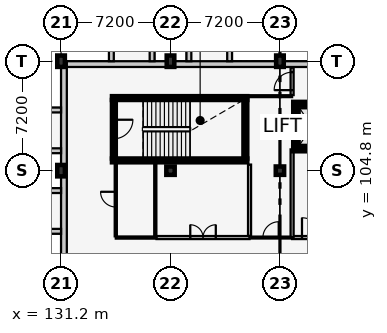
"""IFC4 building model, lengths in metres.
Left out: names, types, materials, properties, quantities, classifications, styles, units other than length and angle.
Written with IfcOpenShell. Run it as: python <this file> out.ifc"""

import sys

from ifc_helpers import new_model, si_unit, direction, frame, frame_2d, origin, origin_2d, place, context, subcontext, project, spatial, rectangle, extrude, element, fill, save


model = new_model("IFC4")
c1 = context("Model", 3, precision=1e-05, world=origin(), true_north=direction((0.0, 1.0)))
c2 = subcontext(c1, "Body", "Model", "MODEL_VIEW")
j1 = project(units=[si_unit("LENGTHUNIT", "METRE"), si_unit("PLANEANGLEUNIT", "RADIAN")], contexts=[c1])
p1 = place(None, origin())
s1 = spatial("IfcSite", under=j1, at=p1, CompositionType="ELEMENT")
p2 = place(p1, origin())
s2 = spatial("IfcBuilding", under=s1, at=p2, CompositionType="ELEMENT")
p3 = place(p2, frame((0.0, 0.0, 25.8)))
s3 = spatial("IfcBuildingStorey", under=s2, at=p3, CompositionType="ELEMENT", Elevation=25.8)
for number, where, z_axis, x_axis in (
    (1, (131.2, 104.8, 0.0), (0.0, 0.0, 1.0), (1.0, 0.0, 0.0)),
    (2, (131.2, 112.0, 0.0), (0.0, 0.0, 1.0), (1.0, 0.0, 0.0)),
):
    element("IfcColumn", number, at=place(p3, frame(where, z_axis=z_axis, x_axis=x_axis)), inside=s3, PredefinedType="COLUMN", context=c2, shape_type="SweptSolid", body=[
        extrude(rectangle(XDim=0.5, YDim=0.75, at=origin_2d()), origin(), (0.0, 0.0, 1.0), 3.9),
    ])
p4 = place(p3, frame((138.4, 104.8, 0.0), z_axis=(0.0, 0.0, 1.0), x_axis=(1.0, 0.0, 0.0)))
e3 = element("IfcColumn", 3, at=p4, inside=s3, PredefinedType="COLUMN", context=c2, shape_type="SweptSolid", body=[
    extrude(rectangle(XDim=0.55, YDim=0.55, at=origin_2d()), origin(), (0.0, 0.0, 1.0), 3.9),
])
p5 = place(p3, frame((138.4, 112.0, 0.0), z_axis=(0.0, 0.0, 1.0), x_axis=(1.0, 0.0, 0.0)))
e4 = element("IfcColumn", 4, at=p5, inside=s3, PredefinedType="COLUMN", context=c2, shape_type="SweptSolid", body=[
    extrude(rectangle(XDim=0.5, YDim=0.75, at=origin_2d()), origin(), (0.0, 0.0, 1.0), 3.9),
])
p6 = place(p3, frame((145.6, 104.8, 0.0), z_axis=(0.0, 0.0, 1.0), x_axis=(1.0, 0.0, 0.0)))
e5 = element("IfcColumn", 5, at=p6, inside=s3, PredefinedType="COLUMN", context=c2, shape_type="SweptSolid", body=[
    extrude(rectangle(XDim=0.55, YDim=0.55, at=origin_2d()), origin(), (0.0, 0.0, 1.0), 3.9),
])
p7 = place(p3, frame((145.6, 112.0, 0.0), z_axis=(0.0, 0.0, 1.0), x_axis=(1.0, 0.0, 0.0)))
e6 = element("IfcColumn", 6, at=p7, inside=s3, PredefinedType="COLUMN", context=c2, shape_type="SweptSolid", body=[
    extrude(rectangle(XDim=0.5, YDim=0.75, at=origin_2d()), origin(), (0.0, 0.0, 1.0), 3.9),
])
p8 = place(p3, frame((131.2, 111.81, 0.0), z_axis=(0.0, 0.0, 1.0), x_axis=(1.0, 0.0, 0.0)))
e7 = element("IfcWall", 7, at=p8, inside=s3, PredefinedType="SOLIDWALL", context=c2, shape_type="SweptSolid", body=[
    extrude(rectangle(XDim=28.8, YDim=0.38, at=frame_2d((14.4, 0.0))), origin(), (0.0, 0.0, 1.0), 2.945),
])
p9 = place(p3, frame((134.51, 112.0, 0.0), z_axis=(0.0, 0.0, 1.0), x_axis=(0.0, 1.0, 0.0)))
e8 = element("IfcWall", 8, at=p9, inside=s3, PredefinedType="SOLIDWALL", context=c2, shape_type="SweptSolid", body=[
    extrude(rectangle(XDim=1.35, YDim=0.32, at=frame_2d((0.675, 0.0))), origin(), (0.0, 0.0, 1.0), 3.63),
])
for number, where, z_axis, x_axis in (
    (9, (137.19, 112.0, 0.0), (0.0, 0.0, 1.0), (0.0, 1.0, 0.0)),
    (10, (139.61, 112.0, 0.0), (0.0, 0.0, 1.0), (0.0, 1.0, 0.0)),
):
    element("IfcWall", number, at=place(p3, frame(where, z_axis=z_axis, x_axis=x_axis)), inside=s3, PredefinedType="SOLIDWALL", context=c2, shape_type="SweptSolid", body=[
        extrude(rectangle(XDim=1.793, YDim=0.32, at=frame_2d((0.896, 0.0))), origin(), (0.0, 0.0, 1.0), 3.63),
    ])
p10 = place(p3, frame((142.29, 112.0, 0.0), z_axis=(0.0, 0.0, 1.0), x_axis=(0.0, 1.0, 0.0)))
e11 = element("IfcWall", 11, at=p10, inside=s3, PredefinedType="SOLIDWALL", context=c2, shape_type="SweptSolid", body=[
    extrude(rectangle(XDim=1.35, YDim=0.32, at=frame_2d((0.675, 0.0))), origin(), (0.0, 0.0, 1.0), 3.63),
])
p11 = place(p3, frame((131.39, 83.2, 0.0), z_axis=(0.0, 0.0, 1.0), x_axis=(0.0, 1.0, 0.0)))
e12 = element("IfcWall", 12, at=p11, inside=s3, PredefinedType="SOLIDWALL", context=c2, shape_type="SweptSolid", body=[
    extrude(rectangle(XDim=28.8, YDim=0.38, at=frame_2d((14.4, 0.0))), origin(), (0.0, 0.0, 1.0), 3.045),
])
p12 = place(p11, frame((10.1, 0.0, 0.0)))
e13 = element("IfcOpeningElement", 13, at=p12, cuts=e12, PredefinedType="OPENING", context=c2, shape_type="SweptSolid", body=[
    extrude(rectangle(XDim=1.4, YDim=2.2, at=frame_2d((0.7, 1.1))), frame((0.0, 0.202, 0.0), z_axis=(0.0, -1.0, 0.0), x_axis=(1.0, 0.0, 0.0)), (0.0, 0.0, 1.0), 0.404),
])
p13 = place(p3, frame((131.2, 100.81, 0.0), z_axis=(0.0, 0.0, 1.0), x_axis=(-1.0, 0.0, 0.0)))
e14 = element("IfcWall", 14, at=p13, inside=s3, PredefinedType="SOLIDWALL", context=c2, shape_type="SweptSolid", body=[
    extrude(rectangle(XDim=1.35, YDim=0.32, at=frame_2d((0.675, 0.0))), origin(), (0.0, 0.0, 1.0), 3.63),
])
for number, where, z_axis, x_axis in (
    (15, (131.2, 103.49, 0.0), (0.0, 0.0, 1.0), (-1.0, 0.0, 0.0)),
    (16, (131.2, 106.11, 0.0), (0.0, 0.0, 1.0), (-1.0, 0.0, 0.0)),
):
    element("IfcWall", number, at=place(p3, frame(where, z_axis=z_axis, x_axis=x_axis)), inside=s3, PredefinedType="SOLIDWALL", context=c2, shape_type="SweptSolid", body=[
        extrude(rectangle(XDim=1.793, YDim=0.32, at=frame_2d((0.896, 0.0))), origin(), (0.0, 0.0, 1.0), 3.63),
    ])
p14 = place(p3, frame((131.2, 108.79, 0.0), z_axis=(0.0, 0.0, 1.0), x_axis=(-1.0, 0.0, 0.0)))
e17 = element("IfcWall", 17, at=p14, inside=s3, PredefinedType="SOLIDWALL", context=c2, shape_type="SweptSolid", body=[
    extrude(rectangle(XDim=1.35, YDim=0.32, at=frame_2d((0.675, 0.0))), origin(), (0.0, 0.0, 1.0), 3.63),
])
for number, where, z_axis, x_axis in (
    (18, (134.55, 105.475, 0.0), (0.0, 0.0, 1.0), (1.0, 0.0, 0.0)),
    (19, (143.45, 109.575, 0.0), (0.0, 0.0, 1.0), (-1.0, 0.0, 0.0)),
):
    element("IfcWall", number, at=place(p3, frame(where, z_axis=z_axis, x_axis=x_axis)), inside=s3, PredefinedType="SHEAR", context=c2, shape_type="SweptSolid", body=[
        extrude(rectangle(XDim=8.9, YDim=0.25, at=frame_2d((4.45, 0.0))), origin(), (0.0, 0.0, 1.0), 3.65),
    ])
p15 = place(p3, frame((134.675, 109.45, 0.0), z_axis=(0.0, 0.0, 1.0), x_axis=(0.0, -1.0, 0.0)))
e20 = element("IfcWall", 20, at=p15, inside=s3, PredefinedType="SHEAR", context=c2, shape_type="SweptSolid", body=[
    extrude(rectangle(XDim=3.85, YDim=0.25, at=frame_2d((1.925, 0.0))), origin(), (0.0, 0.0, 1.0), 3.65),
])
p16 = place(p15, frame((1.3, 0.0, 0.0)))
e21 = element("IfcOpeningElement", 21, at=p16, cuts=e20, PredefinedType="OPENING", context=c2, shape_type="SweptSolid", body=[
    extrude(rectangle(XDim=1.25, YDim=2.15, at=frame_2d((0.625, 1.075))), frame((0.0, 0.137, 0.0), z_axis=(0.0, -1.0, 0.0), x_axis=(1.0, 0.0, 0.0)), (0.0, 0.0, 1.0), 0.274),
])
p17 = place(p3, frame((143.325, 105.6, 0.0), z_axis=(0.0, 0.0, 1.0), x_axis=(0.0, 1.0, 0.0)))
e22 = element("IfcWall", 22, at=p17, inside=s3, PredefinedType="SHEAR", context=c2, shape_type="SweptSolid", body=[
    extrude(rectangle(XDim=3.85, YDim=0.25, at=frame_2d((1.925, 0.0))), origin(), (0.0, 0.0, 1.0), 3.65),
])
p18 = place(p3, frame((146.475, 106.2, 0.0), z_axis=(0.0, 0.0, 1.0), x_axis=(1.0, 0.0, 0.0)))
e23 = element("IfcWall", 23, at=p18, inside=s3, PredefinedType="SHEAR", context=c2, shape_type="SweptSolid", body=[
    extrude(rectangle(XDim=2.45, YDim=0.25, at=frame_2d((1.225, 0.0))), origin(), (0.0, 0.0, 1.0), 3.65),
])
p19 = place(p18, frame((0.675, 0.0, 0.0)))
e24 = element("IfcOpeningElement", 24, at=p19, cuts=e23, PredefinedType="OPENING", context=c2, shape_type="SweptSolid", body=[
    extrude(rectangle(XDim=1.1, YDim=2.15, at=frame_2d((0.55, 1.075))), frame((0.0, 0.137, 0.0), z_axis=(0.0, -1.0, 0.0), x_axis=(1.0, 0.0, 0.0)), (0.0, 0.0, 1.0), 0.274),
])
p20 = place(p3, frame((148.925, 109.2, 0.0), z_axis=(0.0, 0.0, 1.0), x_axis=(-1.0, 0.0, 0.0)))
e25 = element("IfcWall", 25, at=p20, inside=s3, PredefinedType="SHEAR", context=c2, shape_type="SweptSolid", body=[
    extrude(rectangle(XDim=2.45, YDim=0.25, at=frame_2d((1.225, 0.0))), origin(), (0.0, 0.0, 1.0), 3.65),
])
p21 = place(p3, frame((146.6, 109.2, 0.0), z_axis=(0.0, 0.0, 1.0), x_axis=(0.0, -1.0, 0.0)))
e26 = element("IfcWall", 26, at=p21, inside=s3, PredefinedType="SHEAR", context=c2, shape_type="SweptSolid", body=[
    extrude(rectangle(XDim=3.0, YDim=0.25, at=frame_2d((1.5, 0.0))), origin(), (0.0, 0.0, 1.0), 3.65),
])
p22 = place(p3, frame((146.4, 100.4, 0.0), z_axis=(0.0, 0.0, 1.0), x_axis=(1.0, 0.0, 0.0)))
e27 = element("IfcWall", 27, at=p22, inside=s3, PredefinedType="PARTITIONING", context=c2, shape_type="SweptSolid", body=[
    extrude(rectangle(XDim=2.6, YDim=0.2, at=frame_2d((1.3, 0.0))), origin(), (0.0, 0.0, 1.0), 3.65),
])
p23 = place(p22, frame((0.65, 0.0, 0.0)))
e28 = element("IfcOpeningElement", 28, at=p23, cuts=e27, PredefinedType="OPENING", context=c2, shape_type="SweptSolid", body=[
    extrude(rectangle(XDim=1.3, YDim=2.2, at=frame_2d((0.65, 1.1))), frame((0.0, 0.112, 0.0), z_axis=(0.0, -1.0, 0.0), x_axis=(1.0, 0.0, 0.0)), (0.0, 0.0, 1.0), 0.224),
])
p24 = place(p3, frame((146.4, 106.2, 0.0), z_axis=(0.0, 0.0, 1.0), x_axis=(0.0, -1.0, 0.0)))
e29 = element("IfcWall", 29, at=p24, inside=s3, PredefinedType="PARTITIONING", context=c2, shape_type="SweptSolid", body=[
    extrude(rectangle(XDim=5.8, YDim=0.2, at=frame_2d((2.9, 0.0))), origin(), (0.0, 0.0, 1.0), 3.65),
])
p25 = place(p3, frame((134.8, 100.4, 0.0), z_axis=(0.0, 0.0, 1.0), x_axis=(1.0, 0.0, 0.0)))
e30 = element("IfcWall", 30, at=p25, inside=s3, PredefinedType="PARTITIONING", context=c2, shape_type="SweptSolid", body=[
    extrude(rectangle(XDim=2.6, YDim=0.14, at=frame_2d((1.3, 0.0))), origin(), (0.0, 0.0, 1.0), 3.65),
])
p26 = place(p3, frame((134.8, 100.48, 0.0), z_axis=(0.0, 0.0, 1.0), x_axis=(0.0, 1.0, 0.0)))
e31 = element("IfcWall", 31, at=p26, inside=s3, PredefinedType="PARTITIONING", context=c2, shape_type="SweptSolid", body=[
    extrude(rectangle(XDim=4.86, YDim=0.14, at=frame_2d((2.43, 0.0))), origin(), (0.0, 0.0, 1.0), 3.075),
])
p27 = place(p26, frame((1.93, 0.0, 0.0)))
e32 = element("IfcOpeningElement", 32, at=p27, cuts=e31, PredefinedType="OPENING", context=c2, shape_type="SweptSolid", body=[
    extrude(rectangle(XDim=1.0, YDim=2.1, at=frame_2d((0.5, 1.05))), frame((0.0, 0.082, 0.0), z_axis=(0.0, -1.0, 0.0), x_axis=(1.0, 0.0, 0.0)), (0.0, 0.0, 1.0), 0.164),
])
p28 = place(p3, frame((137.4, 100.48, 0.0), z_axis=(0.0, 0.0, 1.0), x_axis=(0.0, 1.0, 0.0)))
e33 = element("IfcWall", 33, at=p28, inside=s3, PredefinedType="PARTITIONING", context=c2, shape_type="SweptSolid", body=[
    extrude(rectangle(XDim=4.86, YDim=0.14, at=frame_2d((2.43, 0.0))), origin(), (0.0, 0.0, 1.0), 3.65),
])
p29 = place(p3, frame((137.48, 100.4, 0.0), z_axis=(0.0, 0.0, 1.0), x_axis=(1.0, 0.0, 0.0)))
e34 = element("IfcWall", 34, at=p29, inside=s3, PredefinedType="PARTITIONING", context=c2, shape_type="SweptSolid", body=[
    extrude(rectangle(XDim=6.12, YDim=0.2, at=frame_2d((3.06, 0.0))), origin(), (0.0, 0.0, 1.0), 3.65),
])
p30 = place(p29, frame((2.22, 0.0, 0.0)))
e35 = element("IfcOpeningElement", 35, at=p30, cuts=e34, PredefinedType="OPENING", context=c2, shape_type="SweptSolid", body=[
    extrude(rectangle(XDim=1.68, YDim=2.3, at=frame_2d((0.84, 1.15))), frame((0.0, 0.112, 0.0), z_axis=(0.0, -1.0, 0.0), x_axis=(1.0, 0.0, 0.0)), (0.0, 0.0, 1.0), 0.224),
])
p31 = place(p3, frame((143.6, 100.51, 0.0), z_axis=(0.0, 0.0, 1.0), x_axis=(0.0, 1.0, 0.0)))
e36 = element("IfcWall", 36, at=p31, inside=s3, PredefinedType="PARTITIONING", context=c2, shape_type="SweptSolid", body=[
    extrude(rectangle(XDim=4.69, YDim=0.2, at=frame_2d((2.345, 0.0))), origin(), (0.0, 0.0, 1.0), 3.65),
])
p32 = place(p3, frame((143.71, 100.4, 0.0), z_axis=(0.0, 0.0, 1.0), x_axis=(1.0, 0.0, 0.0)))
e37 = element("IfcWall", 37, at=p32, inside=s3, PredefinedType="PARTITIONING", context=c2, shape_type="SweptSolid", body=[
    extrude(rectangle(XDim=2.58, YDim=0.125, at=frame_2d((1.29, 0.0))), origin(), (0.0, 0.0, 1.0), 3.65),
])
p33 = place(p32, frame((0.77, 0.0, 0.0)))
e38 = element("IfcOpeningElement", 38, at=p33, cuts=e37, PredefinedType="OPENING", context=c2, shape_type="SweptSolid", body=[
    extrude(rectangle(XDim=1.04, YDim=2.15, at=frame_2d((0.52, 1.075))), frame((0.0, 0.074, 0.0), z_axis=(0.0, -1.0, 0.0), x_axis=(1.0, 0.0, 0.0)), (0.0, 0.0, 1.0), 0.149),
])
p34 = place(p3, frame((143.6, 109.7, 0.0), z_axis=(0.0, 0.0, 1.0), x_axis=(1.0, 0.0, 0.0)))
e39 = element("IfcWall", 39, at=p34, inside=s3, PredefinedType="PARTITIONING", context=c2, shape_type="SweptSolid", body=[
    extrude(rectangle(XDim=2.8, YDim=0.125, at=frame_2d((1.4, 0.0))), origin(), (0.0, 0.0, 1.0), 3.65),
])
p35 = place(p3, frame((146.4, 109.772, 0.0), z_axis=(0.0, 0.0, 1.0), x_axis=(0.0, 1.0, 0.0)))
e40 = element("IfcWall", 40, at=p35, inside=s3, PredefinedType="PARTITIONING", context=c2, shape_type="SweptSolid", body=[
    extrude(rectangle(XDim=1.828, YDim=0.2, at=frame_2d((0.914, 0.0))), origin(), (0.0, 0.0, 1.0), 3.65),
])
p36 = place(p35, frame((0.324, 0.0, 0.0)))
e41 = element("IfcOpeningElement", 41, at=p36, cuts=e40, PredefinedType="OPENING", context=c2, shape_type="SweptSolid", body=[
    extrude(rectangle(XDim=1.18, YDim=2.2, at=frame_2d((0.59, 1.1))), frame((0.0, 0.112, 0.0), z_axis=(0.0, -1.0, 0.0), x_axis=(1.0, 0.0, 0.0)), (0.0, 0.0, 1.0), 0.224),
])
p37 = place(p16, origin())
e42 = element("IfcDoor", 42, at=p37, inside=s3, OperationType="SINGLE_SWING_LEFT", PredefinedType="DOOR", context=c2, shape_type="SweptSolid", body=[
    extrude(rectangle(XDim=1.25, YDim=2.15, at=frame_2d((0.625, 1.075))), frame((0.0, 0.025, 0.0), z_axis=(0.0, -1.0, 0.0), x_axis=(1.0, 0.0, 0.0)), (0.0, 0.0, 1.0), 0.05),
])
fill(e21, e42)
p38 = place(p19, origin())
e43 = element("IfcDoor", 43, at=p38, inside=s3, OperationType="SLIDING_TO_LEFT", PredefinedType="DOOR", context=c2, shape_type="SweptSolid", body=[
    extrude(rectangle(XDim=1.1, YDim=2.15, at=frame_2d((0.55, 1.075))), frame((0.0, 0.025, 0.0), z_axis=(0.0, -1.0, 0.0), x_axis=(1.0, 0.0, 0.0)), (0.0, 0.0, 1.0), 0.05),
])
fill(e24, e43)
p39 = place(p23, origin())
e44 = element("IfcDoor", 44, at=p39, inside=s3, OperationType="SINGLE_SWING_LEFT", PredefinedType="DOOR", context=c2, shape_type="SweptSolid", body=[
    extrude(rectangle(XDim=1.3, YDim=2.2, at=frame_2d((0.65, 1.1))), frame((0.0, 0.025, 0.0), z_axis=(0.0, -1.0, 0.0), x_axis=(1.0, 0.0, 0.0)), (0.0, 0.0, 1.0), 0.05),
])
fill(e28, e44)
p40 = place(p27, origin())
e45 = element("IfcDoor", 45, at=p40, inside=s3, OperationType="SINGLE_SWING_RIGHT", PredefinedType="DOOR", context=c2, shape_type="SweptSolid", body=[
    extrude(rectangle(XDim=1.0, YDim=2.1, at=frame_2d((0.5, 1.05))), frame((0.0, 0.025, 0.0), z_axis=(0.0, -1.0, 0.0), x_axis=(1.0, 0.0, 0.0)), (0.0, 0.0, 1.0), 0.05),
])
fill(e32, e45)
p41 = place(p30, origin())
e46 = element("IfcDoor", 46, at=p41, inside=s3, OperationType="DOUBLE_DOOR_SINGLE_SWING", PredefinedType="DOOR", context=c2, shape_type="SweptSolid", body=[
    extrude(rectangle(XDim=1.68, YDim=2.3, at=frame_2d((0.84, 1.15))), frame((0.0, 0.025, 0.0), z_axis=(0.0, -1.0, 0.0), x_axis=(1.0, 0.0, 0.0)), (0.0, 0.0, 1.0), 0.05),
])
fill(e35, e46)
p42 = place(p33, origin())
e47 = element("IfcDoor", 47, at=p42, inside=s3, OperationType="SINGLE_SWING_RIGHT", PredefinedType="DOOR", context=c2, shape_type="SweptSolid", body=[
    extrude(rectangle(XDim=1.04, YDim=2.15, at=frame_2d((0.52, 1.075))), frame((0.0, 0.025, 0.0), z_axis=(0.0, -1.0, 0.0), x_axis=(1.0, 0.0, 0.0)), (0.0, 0.0, 1.0), 0.05),
])
fill(e38, e47)
p43 = place(p36, origin())
e48 = element("IfcDoor", 48, at=p43, inside=s3, OperationType="SINGLE_SWING_LEFT", PredefinedType="DOOR", context=c2, shape_type="SweptSolid", body=[
    extrude(rectangle(XDim=1.18, YDim=2.2, at=frame_2d((0.59, 1.1))), frame((0.0, 0.025, 0.0), z_axis=(0.0, -1.0, 0.0), x_axis=(1.0, 0.0, 0.0)), (0.0, 0.0, 1.0), 0.05),
])
fill(e41, e48)
save(model, sys.argv[1])
